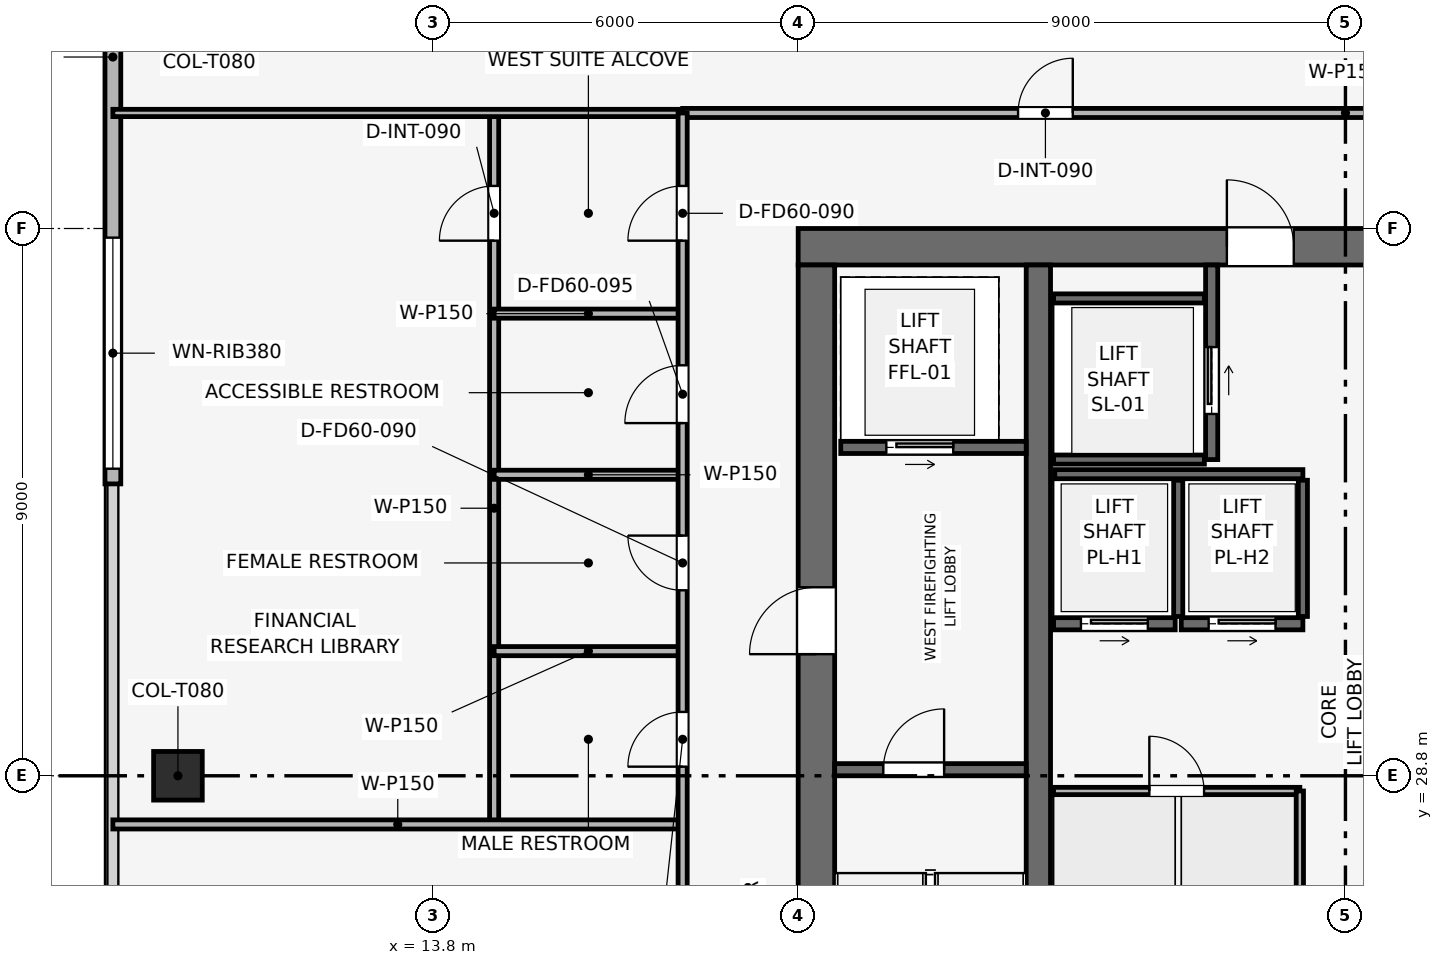
"""IFC4 building model, lengths in metres.
Left out: names, types, materials, properties, quantities, classifications, styles, units other than length and angle.
Written with IfcOpenShell. Run it as: python <this file> out.ifc"""

import sys

from ifc_helpers import new_model, si_unit, direction, frame, frame_2d, origin, origin_2d, place, context, subcontext, project, spatial, rectangle, extrude, element, fill, save


model = new_model("IFC4")
c1 = context("Model", 3, precision=1e-05, world=origin(), true_north=direction((0.0, 1.0)))
c2 = subcontext(c1, "Body", "Model", "MODEL_VIEW")
j1 = project(units=[si_unit("LENGTHUNIT", "METRE"), si_unit("PLANEANGLEUNIT", "RADIAN")], contexts=[c1])
p1 = place(None, origin())
s1 = spatial("IfcSite", under=j1, at=p1, CompositionType="ELEMENT")
p2 = place(p1, origin())
s2 = spatial("IfcBuilding", under=s1, at=p2, CompositionType="ELEMENT")
p3 = place(p2, frame((0.0, 0.0, 360.0)))
s3 = spatial("IfcBuildingStorey", under=s2, at=p3, CompositionType="ELEMENT", Elevation=360.0)
p4 = place(p3, frame((19.8, 37.5, 0.0), z_axis=(0.0, 0.0, 1.0), x_axis=(1.0, 0.0, 0.0)))
e1 = element("IfcWall", 1, at=p4, inside=s3, PredefinedType="SHEAR", context=c2, shape_type="SweptSolid", body=[
    extrude(rectangle(XDim=18.0, YDim=0.6, at=frame_2d((9.0, 0.0))), origin(), (0.0, 0.0, 1.0), 4.5),
])
p5 = place(p4, frame((7.05, 0.0, 0.0)))
e2 = element("IfcOpeningElement", 2, at=p5, cuts=e1, PredefinedType="OPENING", context=c2, shape_type="SweptSolid", body=[
    extrude(rectangle(XDim=1.1, YDim=2.15, at=frame_2d((0.55, 1.075))), frame((0.0, 0.31, 0.0), z_axis=(0.0, -1.0, 0.0), x_axis=(1.0, 0.0, 0.0)), (0.0, 0.0, 1.0), 0.62),
])
p6 = place(p3, frame((20.1, 20.4, 0.0), z_axis=(0.0, 0.0, 1.0), x_axis=(0.0, 1.0, 0.0)))
e3 = element("IfcWall", 3, at=p6, inside=s3, PredefinedType="SHEAR", context=c2, shape_type="SweptSolid", body=[
    extrude(rectangle(XDim=16.8, YDim=0.6, at=frame_2d((8.4, 0.0))), origin(), (0.0, 0.0, 1.0), 4.5),
])
p7 = place(p6, frame((10.4, 0.0, 0.0)))
e4 = element("IfcOpeningElement", 4, at=p7, cuts=e3, PredefinedType="OPENING", context=c2, shape_type="SweptSolid", body=[
    extrude(rectangle(XDim=1.1, YDim=2.15, at=frame_2d((0.55, 1.075))), frame((0.0, 0.31, 0.0), z_axis=(0.0, -1.0, 0.0), x_axis=(1.0, 0.0, 0.0)), (0.0, 0.0, 1.0), 0.62),
])
p8 = place(p3, frame((23.75, 20.4, 0.0), z_axis=(0.0, 0.0, 1.0), x_axis=(0.0, 1.0, 0.0)))
e5 = element("IfcWall", 5, at=p8, inside=s3, PredefinedType="SHEAR", context=c2, shape_type="SweptSolid", body=[
    extrude(rectangle(XDim=16.8, YDim=0.4, at=frame_2d((8.4, 0.0))), origin(), (0.0, 0.0, 1.0), 4.5),
])
p9 = place(p3, frame((9.6, 28.8, 0.003), z_axis=(0.0, 0.0, 1.0), x_axis=(1.0, 0.0, 0.0)))
e6 = element("IfcColumn", 6, at=p9, inside=s3, PredefinedType="COLUMN", context=c2, shape_type="SweptSolid", body=[
    extrude(rectangle(XDim=0.8, YDim=0.8, at=origin_2d()), origin(), (0.0, 0.0, 1.0), 4.234),
])
p10 = place(p3, frame((8.53, 33.6, 0.0), z_axis=(0.0, 0.0, 1.0), x_axis=(0.0, 1.0, 0.0)))
e7 = element("IfcWall", 7, at=p10, inside=s3, PredefinedType="SOLIDWALL", context=c2, shape_type="SweptSolid", body=[
    extrude(rectangle(XDim=10.0, YDim=0.26, at=frame_2d((5.0, 0.0))), origin(), (0.0, 0.0, 1.0), 4.24),
])
p11 = place(p10, frame((0.25, 0.0, 0.9)))
e8 = element("IfcOpeningElement", 8, at=p11, cuts=e7, PredefinedType="OPENING", context=c2, shape_type="SweptSolid", body=[
    extrude(rectangle(XDim=3.8, YDim=1.9, at=frame_2d((1.9, 0.95))), frame((0.0, 0.14, 0.0), z_axis=(0.0, -1.0, 0.0), x_axis=(1.0, 0.0, 0.0)), (0.0, 0.0, 1.0), 0.28),
])
p12 = place(p3, frame((20.4, 28.9, 0.0), z_axis=(0.0, 0.0, 1.0), x_axis=(1.0, 0.0, 0.0)))
e9 = element("IfcWall", 9, at=p12, inside=s3, PredefinedType="SHEAR", context=c2, shape_type="SweptSolid", body=[
    extrude(rectangle(XDim=3.15, YDim=0.2, at=frame_2d((1.575, 0.0))), origin(), (0.0, 0.0, 1.0), 4.24),
])
p13 = place(p12, frame((0.8, 0.0, 0.0)))
e10 = element("IfcOpeningElement", 10, at=p13, cuts=e9, PredefinedType="OPENING", context=c2, shape_type="SweptSolid", body=[
    extrude(rectangle(XDim=1.0, YDim=2.1, at=frame_2d((0.5, 1.05))), frame((0.0, 0.11, 0.0), z_axis=(0.0, -1.0, 0.0), x_axis=(1.0, 0.0, 0.0)), (0.0, 0.0, 1.0), 0.22),
])
p14 = place(p3, frame((20.5, 34.2, 0.0), z_axis=(0.0, 0.0, 1.0), x_axis=(1.0, 0.0, 0.0)))
e11 = element("IfcWall", 11, at=p14, inside=s3, PredefinedType="SHEAR", context=c2, shape_type="SweptSolid", body=[
    extrude(rectangle(XDim=3.05, YDim=0.2, at=frame_2d((1.525, 0.0))), origin(), (0.0, 0.0, 1.0), 4.24),
])
p15 = place(p14, frame((0.75, 0.0, 0.0)))
e12 = element("IfcOpeningElement", 12, at=p15, cuts=e11, PredefinedType="OPENING", context=c2, shape_type="SweptSolid", body=[
    extrude(rectangle(XDim=1.1, YDim=2.15, at=frame_2d((0.55, 1.075))), frame((0.0, 0.11, 0.0), z_axis=(0.0, -1.0, 0.0), x_axis=(1.0, 0.0, 0.0)), (0.0, 0.0, 1.0), 0.22),
])
p16 = place(p3, frame((26.6, 34.0, 0.0), z_axis=(0.0, 0.0, 1.0), x_axis=(0.0, 1.0, 0.0)))
e13 = element("IfcWall", 13, at=p16, inside=s3, PredefinedType="SHEAR", context=c2, shape_type="SweptSolid", body=[
    extrude(rectangle(XDim=3.2, YDim=0.2, at=frame_2d((1.6, 0.0))), origin(), (0.0, 0.0, 1.0), 4.24),
])
p17 = place(p16, frame((0.75, 0.0, 0.0)))
e14 = element("IfcOpeningElement", 14, at=p17, cuts=e13, PredefinedType="OPENING", context=c2, shape_type="SweptSolid", body=[
    extrude(rectangle(XDim=1.1, YDim=2.15, at=frame_2d((0.55, 1.075))), frame((0.0, 0.11, 0.0), z_axis=(0.0, -1.0, 0.0), x_axis=(1.0, 0.0, 0.0)), (0.0, 0.0, 1.0), 0.22),
])
for number, where, z_axis, x_axis in (
    (15, (24.0, 34.0, 0.0), (0.0, 0.0, 1.0), (1.0, 0.0, 0.0)),
    (16, (24.0, 36.65, 0.0), (0.0, 0.0, 1.0), (1.0, 0.0, 0.0)),
):
    element("IfcWall", number, at=place(p3, frame(where, z_axis=z_axis, x_axis=x_axis)), inside=s3, PredefinedType="SHEAR", context=c2, shape_type="SweptSolid", body=[
        extrude(rectangle(XDim=2.48, YDim=0.15, at=frame_2d((1.24, 0.0))), origin(), (0.0, 0.0, 1.0), 4.24),
    ])
p18 = place(p3, frame((24.0, 31.3, 0.0), z_axis=(0.0, 0.0, 1.0), x_axis=(1.0, 0.0, 0.0)))
e17 = element("IfcWall", 17, at=p18, inside=s3, PredefinedType="SHEAR", context=c2, shape_type="SweptSolid", body=[
    extrude(rectangle(XDim=2.0, YDim=0.2, at=frame_2d((1.0, 0.0))), origin(), (0.0, 0.0, 1.0), 4.24),
])
p19 = place(p18, frame((0.45, 0.0, 0.0)))
e18 = element("IfcOpeningElement", 18, at=p19, cuts=e17, PredefinedType="OPENING", context=c2, shape_type="SweptSolid", body=[
    extrude(rectangle(XDim=1.1, YDim=2.15, at=frame_2d((0.55, 1.075))), frame((0.0, 0.11, 0.0), z_axis=(0.0, -1.0, 0.0), x_axis=(1.0, 0.0, 0.0)), (0.0, 0.0, 1.0), 0.22),
])
p20 = place(p3, frame((26.1, 31.3, 0.0), z_axis=(0.0, 0.0, 1.0), x_axis=(1.0, 0.0, 0.0)))
e19 = element("IfcWall", 19, at=p20, inside=s3, PredefinedType="SHEAR", context=c2, shape_type="SweptSolid", body=[
    extrude(rectangle(XDim=2.0, YDim=0.2, at=frame_2d((1.0, 0.0))), origin(), (0.0, 0.0, 1.0), 4.24),
])
p21 = place(p20, frame((0.45, 0.0, 0.0)))
e20 = element("IfcOpeningElement", 20, at=p21, cuts=e19, PredefinedType="OPENING", context=c2, shape_type="SweptSolid", body=[
    extrude(rectangle(XDim=1.1, YDim=2.15, at=frame_2d((0.55, 1.075))), frame((0.0, 0.11, 0.0), z_axis=(0.0, -1.0, 0.0), x_axis=(1.0, 0.0, 0.0)), (0.0, 0.0, 1.0), 0.22),
])
p22 = place(p3, frame((24.02, 33.76, 0.0), z_axis=(0.0, 0.0, 1.0), x_axis=(1.0, 0.0, 0.0)))
e21 = element("IfcWall", 21, at=p22, inside=s3, PredefinedType="SHEAR", context=c2, shape_type="SweptSolid", body=[
    extrude(rectangle(XDim=4.08, YDim=0.15, at=frame_2d((2.04, 0.0))), origin(), (0.0, 0.0, 1.0), 4.24),
])
for number, where, z_axis, x_axis in (
    (22, (26.05, 31.42, 0.0), (0.0, 0.0, 1.0), (0.0, 1.0, 0.0)),
    (23, (28.1, 31.42, 0.0), (0.0, 0.0, 1.0), (0.0, 1.0, 0.0)),
):
    element("IfcWall", number, at=place(p3, frame(where, z_axis=z_axis, x_axis=x_axis)), inside=s3, PredefinedType="SHEAR", context=c2, shape_type="SweptSolid", body=[
        extrude(rectangle(XDim=2.24, YDim=0.15, at=frame_2d((1.12, 0.0))), origin(), (0.0, 0.0, 1.0), 4.24),
    ])
p23 = place(p3, frame((24.0, 28.55, 0.0), z_axis=(0.0, 0.0, 1.0), x_axis=(1.0, 0.0, 0.0)))
e24 = element("IfcWall", 24, at=p23, inside=s3, PredefinedType="PARTITIONING", context=c2, shape_type="SweptSolid", body=[
    extrude(rectangle(XDim=4.05, YDim=0.12, at=frame_2d((2.025, 0.0))), origin(), (0.0, 0.0, 1.0), 4.24),
])
p24 = place(p23, frame((1.575, 0.0, 0.0)))
e25 = element("IfcOpeningElement", 25, at=p24, cuts=e24, PredefinedType="OPENING", context=c2, shape_type="SweptSolid", body=[
    extrude(rectangle(XDim=0.9, YDim=2.1, at=frame_2d((0.45, 1.05))), frame((0.0, 0.07, 0.0), z_axis=(0.0, -1.0, 0.0), x_axis=(1.0, 0.0, 0.0)), (0.0, 0.0, 1.0), 0.14),
])
p25 = place(p3, frame((28.05, 20.4, 0.0), z_axis=(0.0, 0.0, 1.0), x_axis=(0.0, 1.0, 0.0)))
e26 = element("IfcWall", 26, at=p25, inside=s3, PredefinedType="PARTITIONING", context=c2, shape_type="SweptSolid", body=[
    extrude(rectangle(XDim=8.15, YDim=0.12, at=frame_2d((4.075, 0.0))), origin(), (0.0, 0.0, 1.0), 4.24),
])
p26 = place(p3, frame((14.8, 28.0, 0.0), z_axis=(0.0, 0.0, 1.0), x_axis=(0.0, 1.0, 0.0)))
e27 = element("IfcWall", 27, at=p26, inside=s3, PredefinedType="PARTITIONING", context=c2, shape_type="SweptSolid", body=[
    extrude(rectangle(XDim=11.7, YDim=0.15, at=frame_2d((5.85, 0.0))), origin(), (0.0, 0.0, 1.0), 3.825),
])
p27 = place(p26, frame((9.6, 0.0, 0.0)))
e28 = element("IfcOpeningElement", 28, at=p27, cuts=e27, PredefinedType="OPENING", context=c2, shape_type="SweptSolid", body=[
    extrude(rectangle(XDim=0.9, YDim=2.1, at=frame_2d((0.45, 1.05))), frame((0.0, 0.085, 0.0), z_axis=(0.0, -1.0, 0.0), x_axis=(1.0, 0.0, 0.0)), (0.0, 0.0, 1.0), 0.17),
])
p28 = place(p3, frame((8.53, 28.0, 0.0), z_axis=(0.0, 0.0, 1.0), x_axis=(1.0, 0.0, 0.0)))
e29 = element("IfcWall", 29, at=p28, inside=s3, PredefinedType="PARTITIONING", context=c2, shape_type="SweptSolid", body=[
    extrude(rectangle(XDim=9.37, YDim=0.15, at=frame_2d((4.685, 0.0))), origin(), (0.0, 0.0, 1.0), 3.865),
])
for number, where, z_axis, x_axis in (
    (30, (14.8, 36.4, 0.0), (0.0, 0.0, 1.0), (1.0, 0.0, 0.0)),
    (31, (14.8, 30.85, 0.0), (0.0, 0.0, 1.0), (1.0, 0.0, 0.0)),
    (32, (14.8, 33.75, 0.0), (0.0, 0.0, 1.0), (1.0, 0.0, 0.0)),
):
    element("IfcWall", number, at=place(p3, frame(where, z_axis=z_axis, x_axis=x_axis)), inside=s3, PredefinedType="PARTITIONING", context=c2, shape_type="SweptSolid", body=[
        extrude(rectangle(XDim=3.1, YDim=0.15, at=frame_2d((1.55, 0.0))), origin(), (0.0, 0.0, 1.0), 3.865),
    ])
p29 = place(p3, frame((8.53, 39.7, 0.0), z_axis=(0.0, 0.0, 1.0), x_axis=(1.0, 0.0, 0.0)))
e33 = element("IfcWall", 33, at=p29, inside=s3, PredefinedType="PARTITIONING", context=c2, shape_type="SweptSolid", body=[
    extrude(rectangle(XDim=9.37, YDim=0.12, at=frame_2d((4.685, 0.0))), origin(), (0.0, 0.0, 1.0), 3.825),
])
p30 = place(p3, frame((17.9, 39.7, 0.0), z_axis=(0.0, 0.0, 1.0), x_axis=(1.0, 0.0, 0.0)))
e34 = element("IfcWall", 34, at=p30, inside=s3, PredefinedType="PARTITIONING", context=c2, shape_type="SweptSolid", body=[
    extrude(rectangle(XDim=21.8, YDim=0.15, at=frame_2d((10.9, 0.0))), origin(), (0.0, 0.0, 1.0), 3.825),
])
p31 = place(p30, frame((5.516, 0.0, 0.0)))
e35 = element("IfcOpeningElement", 35, at=p31, cuts=e34, PredefinedType="OPENING", context=c2, shape_type="SweptSolid", body=[
    extrude(rectangle(XDim=0.9, YDim=2.1, at=frame_2d((0.45, 1.05))), frame((0.0, 0.085, 0.0), z_axis=(0.0, -1.0, 0.0), x_axis=(1.0, 0.0, 0.0)), (0.0, 0.0, 1.0), 0.17),
])
p32 = place(p30, frame((16.416, 0.0, 0.0)))
e36 = element("IfcOpeningElement", 36, at=p32, cuts=e34, PredefinedType="OPENING", context=c2, shape_type="SweptSolid", body=[
    extrude(rectangle(XDim=0.9, YDim=2.1, at=frame_2d((0.45, 1.05))), frame((0.0, 0.085, 0.0), z_axis=(0.0, -1.0, 0.0), x_axis=(1.0, 0.0, 0.0)), (0.0, 0.0, 1.0), 0.17),
])
p33 = place(p3, frame((17.9, 14.0, 0.0), z_axis=(0.0, 0.0, 1.0), x_axis=(0.0, 1.0, 0.0)))
e37 = element("IfcWall", 37, at=p33, inside=s3, PredefinedType="PARTITIONING", context=c2, shape_type="SweptSolid", body=[
    extrude(rectangle(XDim=25.7, YDim=0.15, at=frame_2d((12.85, 0.0))), origin(), (0.0, 0.0, 1.0), 3.825),
])
p34 = place(p33, frame((6.55, 0.0, 0.0)))
e38 = element("IfcOpeningElement", 38, at=p34, cuts=e37, PredefinedType="OPENING", context=c2, shape_type="SweptSolid", body=[
    extrude(rectangle(XDim=0.9, YDim=2.1, at=frame_2d((0.45, 1.05))), frame((0.0, 0.085, 0.0), z_axis=(0.0, -1.0, 0.0), x_axis=(1.0, 0.0, 0.0)), (0.0, 0.0, 1.0), 0.17),
])
p35 = place(p33, frame((14.95, 0.0, 0.0)))
e39 = element("IfcOpeningElement", 39, at=p35, cuts=e37, PredefinedType="OPENING", context=c2, shape_type="SweptSolid", body=[
    extrude(rectangle(XDim=0.9, YDim=2.1, at=frame_2d((0.45, 1.05))), frame((0.0, 0.085, 0.0), z_axis=(0.0, -1.0, 0.0), x_axis=(1.0, 0.0, 0.0)), (0.0, 0.0, 1.0), 0.17),
])
p36 = place(p33, frame((17.85, 0.0, 0.0)))
e40 = element("IfcOpeningElement", 40, at=p36, cuts=e37, PredefinedType="OPENING", context=c2, shape_type="SweptSolid", body=[
    extrude(rectangle(XDim=0.9, YDim=2.1, at=frame_2d((0.45, 1.05))), frame((0.0, 0.085, 0.0), z_axis=(0.0, -1.0, 0.0), x_axis=(1.0, 0.0, 0.0)), (0.0, 0.0, 1.0), 0.17),
])
p37 = place(p33, frame((20.6, 0.0, 0.0)))
e41 = element("IfcOpeningElement", 41, at=p37, cuts=e37, PredefinedType="OPENING", context=c2, shape_type="SweptSolid", body=[
    extrude(rectangle(XDim=0.95, YDim=2.1, at=frame_2d((0.475, 1.05))), frame((0.0, 0.085, 0.0), z_axis=(0.0, -1.0, 0.0), x_axis=(1.0, 0.0, 0.0)), (0.0, 0.0, 1.0), 0.17),
])
p38 = place(p33, frame((23.6, 0.0, 0.0)))
e42 = element("IfcOpeningElement", 42, at=p38, cuts=e37, PredefinedType="OPENING", context=c2, shape_type="SweptSolid", body=[
    extrude(rectangle(XDim=0.9, YDim=2.1, at=frame_2d((0.45, 1.05))), frame((0.0, 0.085, 0.0), z_axis=(0.0, -1.0, 0.0), x_axis=(1.0, 0.0, 0.0)), (0.0, 0.0, 1.0), 0.17),
])
p39 = place(p11, origin())
e43 = element("IfcWindow", 43, at=p39, inside=s3, PartitioningType="SINGLE_PANEL", PredefinedType="WINDOW", context=c2, shape_type="SweptSolid", body=[
    extrude(rectangle(XDim=3.8, YDim=1.9, at=frame_2d((1.9, 0.95))), frame((0.0, 0.03, 0.0), z_axis=(0.0, -1.0, 0.0), x_axis=(1.0, 0.0, 0.0)), (0.0, 0.0, 1.0), 0.06),
])
fill(e8, e43)
p40 = place(p13, origin())
e44 = element("IfcDoor", 44, at=p40, inside=s3, OperationType="SINGLE_SWING_RIGHT", PredefinedType="DOOR", context=c2, shape_type="SweptSolid", body=[
    extrude(rectangle(XDim=1.0, YDim=2.1, at=frame_2d((0.5, 1.05))), frame((0.0, 0.025, 0.0), z_axis=(0.0, -1.0, 0.0), x_axis=(1.0, 0.0, 0.0)), (0.0, 0.0, 1.0), 0.05),
])
fill(e10, e44)
p41 = place(p15, origin())
e45 = element("IfcDoor", 45, at=p41, inside=s3, OperationType="SLIDING_TO_RIGHT", PredefinedType="DOOR", context=c2, shape_type="SweptSolid", body=[
    extrude(rectangle(XDim=1.1, YDim=2.15, at=frame_2d((0.55, 1.075))), frame((0.0, 0.025, 0.0), z_axis=(0.0, -1.0, 0.0), x_axis=(1.0, 0.0, 0.0)), (0.0, 0.0, 1.0), 0.05),
])
fill(e12, e45)
p42 = place(p17, origin())
e46 = element("IfcDoor", 46, at=p42, inside=s3, OperationType="SLIDING_TO_RIGHT", PredefinedType="DOOR", context=c2, shape_type="SweptSolid", body=[
    extrude(rectangle(XDim=1.1, YDim=2.15, at=frame_2d((0.55, 1.075))), frame((0.0, 0.025, 0.0), z_axis=(0.0, -1.0, 0.0), x_axis=(1.0, 0.0, 0.0)), (0.0, 0.0, 1.0), 0.05),
])
fill(e14, e46)
p43 = place(p19, origin())
e47 = element("IfcDoor", 47, at=p43, inside=s3, OperationType="SLIDING_TO_RIGHT", PredefinedType="DOOR", context=c2, shape_type="SweptSolid", body=[
    extrude(rectangle(XDim=1.1, YDim=2.15, at=frame_2d((0.55, 1.075))), frame((0.0, 0.025, 0.0), z_axis=(0.0, -1.0, 0.0), x_axis=(1.0, 0.0, 0.0)), (0.0, 0.0, 1.0), 0.05),
])
fill(e18, e47)
p44 = place(p21, origin())
e48 = element("IfcDoor", 48, at=p44, inside=s3, OperationType="SLIDING_TO_RIGHT", PredefinedType="DOOR", context=c2, shape_type="SweptSolid", body=[
    extrude(rectangle(XDim=1.1, YDim=2.15, at=frame_2d((0.55, 1.075))), frame((0.0, 0.025, 0.0), z_axis=(0.0, -1.0, 0.0), x_axis=(1.0, 0.0, 0.0)), (0.0, 0.0, 1.0), 0.05),
])
fill(e20, e48)
p45 = place(p24, origin())
e49 = element("IfcDoor", 49, at=p45, inside=s3, OperationType="SINGLE_SWING_LEFT", PredefinedType="DOOR", context=c2, shape_type="SweptSolid", body=[
    extrude(rectangle(XDim=0.9, YDim=2.1, at=frame_2d((0.45, 1.05))), frame((0.0, 0.025, 0.0), z_axis=(0.0, -1.0, 0.0), x_axis=(1.0, 0.0, 0.0)), (0.0, 0.0, 1.0), 0.05),
])
fill(e25, e49)
p46 = place(p27, origin())
e50 = element("IfcDoor", 50, at=p46, inside=s3, OperationType="SINGLE_SWING_LEFT", PredefinedType="DOOR", context=c2, shape_type="SweptSolid", body=[
    extrude(rectangle(XDim=0.9, YDim=2.1, at=frame_2d((0.45, 1.05))), frame((0.0, 0.025, 0.0), z_axis=(0.0, -1.0, 0.0), x_axis=(1.0, 0.0, 0.0)), (0.0, 0.0, 1.0), 0.05),
])
fill(e28, e50)
p47 = place(p31, origin())
e51 = element("IfcDoor", 51, at=p47, inside=s3, OperationType="SINGLE_SWING_RIGHT", PredefinedType="DOOR", context=c2, shape_type="SweptSolid", body=[
    extrude(rectangle(XDim=0.9, YDim=2.1, at=frame_2d((0.45, 1.05))), frame((0.0, 0.025, 0.0), z_axis=(0.0, -1.0, 0.0), x_axis=(1.0, 0.0, 0.0)), (0.0, 0.0, 1.0), 0.05),
])
fill(e35, e51)
p48 = place(p35, origin())
e52 = element("IfcDoor", 52, at=p48, inside=s3, OperationType="SINGLE_SWING_LEFT", PredefinedType="DOOR", context=c2, shape_type="SweptSolid", body=[
    extrude(rectangle(XDim=0.9, YDim=2.1, at=frame_2d((0.45, 1.05))), frame((0.0, 0.025, 0.0), z_axis=(0.0, -1.0, 0.0), x_axis=(1.0, 0.0, 0.0)), (0.0, 0.0, 1.0), 0.05),
])
fill(e39, e52)
p49 = place(p36, origin())
e53 = element("IfcDoor", 53, at=p49, inside=s3, OperationType="SINGLE_SWING_RIGHT", PredefinedType="DOOR", context=c2, shape_type="SweptSolid", body=[
    extrude(rectangle(XDim=0.9, YDim=2.1, at=frame_2d((0.45, 1.05))), frame((0.0, 0.025, 0.0), z_axis=(0.0, -1.0, 0.0), x_axis=(1.0, 0.0, 0.0)), (0.0, 0.0, 1.0), 0.05),
])
fill(e40, e53)
p50 = place(p37, origin())
e54 = element("IfcDoor", 54, at=p50, inside=s3, OperationType="SINGLE_SWING_LEFT", PredefinedType="DOOR", context=c2, shape_type="SweptSolid", body=[
    extrude(rectangle(XDim=0.95, YDim=2.1, at=frame_2d((0.475, 1.05))), frame((0.0, 0.025, 0.0), z_axis=(0.0, -1.0, 0.0), x_axis=(1.0, 0.0, 0.0)), (0.0, 0.0, 1.0), 0.05),
])
fill(e41, e54)
p51 = place(p38, origin())
e55 = element("IfcDoor", 55, at=p51, inside=s3, OperationType="SINGLE_SWING_LEFT", PredefinedType="DOOR", context=c2, shape_type="SweptSolid", body=[
    extrude(rectangle(XDim=0.9, YDim=2.1, at=frame_2d((0.45, 1.05))), frame((0.0, 0.025, 0.0), z_axis=(0.0, -1.0, 0.0), x_axis=(1.0, 0.0, 0.0)), (0.0, 0.0, 1.0), 0.05),
])
fill(e42, e55)
p52 = place(p7, origin())
e56 = element("IfcDoor", 56, at=p52, inside=s3, OperationType="SINGLE_SWING_LEFT", PredefinedType="DOOR", context=c2, shape_type="SweptSolid", body=[
    extrude(rectangle(XDim=1.1, YDim=2.15, at=frame_2d((0.55, 1.075))), frame((0.0, 0.025, 0.0), z_axis=(0.0, -1.0, 0.0), x_axis=(1.0, 0.0, 0.0)), (0.0, 0.0, 1.0), 0.05),
])
fill(e4, e56)
p53 = place(p5, origin())
e57 = element("IfcDoor", 57, at=p53, inside=s3, OperationType="SINGLE_SWING_LEFT", PredefinedType="DOOR", context=c2, shape_type="SweptSolid", body=[
    extrude(rectangle(XDim=1.1, YDim=2.15, at=frame_2d((0.55, 1.075))), frame((0.0, 0.025, 0.0), z_axis=(0.0, -1.0, 0.0), x_axis=(1.0, 0.0, 0.0)), (0.0, 0.0, 1.0), 0.05),
])
fill(e2, e57)
save(model, sys.argv[1])
